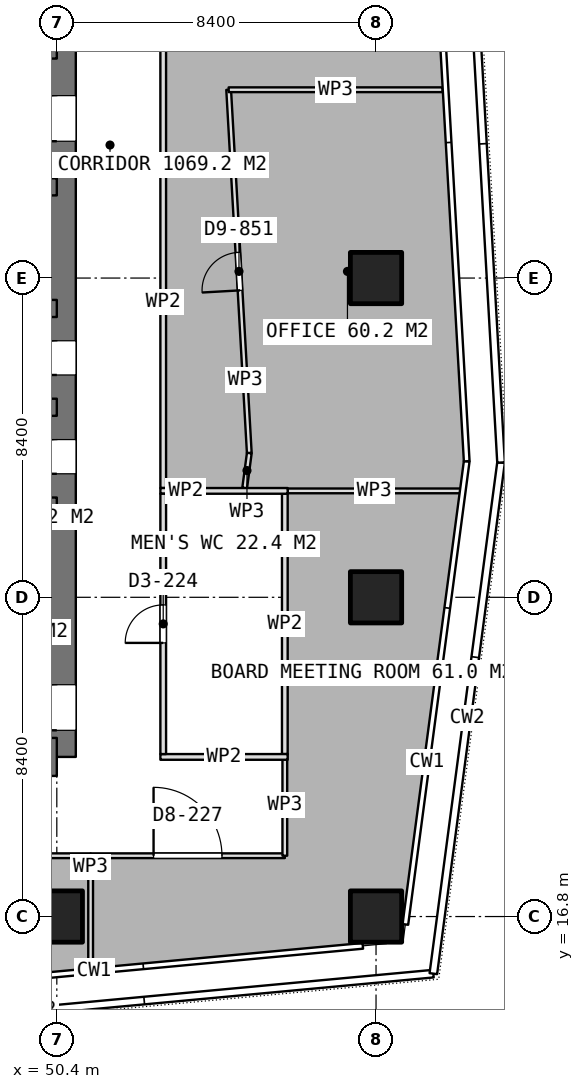
"""IFC4 building model, lengths in metres.
Left out: names, types, materials, properties, quantities, classifications, styles, units other than length and angle.
Written with IfcOpenShell. Run it as: python <this file> out.ifc"""

import sys

from ifc_helpers import new_model, si_unit, direction, frame, frame_2d, origin, origin_2d, place, context, subcontext, project, spatial, rectangle, extrude, element, fill, save


model = new_model("IFC4")
c1 = context("Model", 3, precision=1e-05, world=origin(), true_north=direction((0.0, 1.0)))
c2 = subcontext(c1, "Body", "Model", "MODEL_VIEW")
j1 = project(units=[si_unit("LENGTHUNIT", "METRE"), si_unit("PLANEANGLEUNIT", "RADIAN")], contexts=[c1])
p1 = place(None, origin())
s1 = spatial("IfcSite", under=j1, at=p1, CompositionType="ELEMENT")
p2 = place(p1, origin())
s2 = spatial("IfcBuilding", under=s1, at=p2, CompositionType="ELEMENT")
p3 = place(p2, frame((0.0, 0.0, 210.2)))
s3 = spatial("IfcBuildingStorey", under=s2, at=p3, CompositionType="ELEMENT", Elevation=210.2)
p4 = place(p3, frame((40.0, 21.0, 0.0), z_axis=(0.0, 0.0, 1.0), x_axis=(1.0, 0.0, 0.0)))
e1 = element("IfcWall", 1, at=p4, inside=s3, PredefinedType="SHEAR", context=c2, shape_type="SweptSolid", body=[
    extrude(rectangle(XDim=10.4, YDim=1.0, at=frame_2d((5.2, 0.0))), origin(), (0.0, 0.0, 1.0), 3.75),
])
p5 = place(p3, frame((50.4, 21.0, 0.0), z_axis=(0.0, 0.0, 1.0), x_axis=(0.0, 1.0, 0.0)))
e2 = element("IfcWall", 2, at=p5, inside=s3, PredefinedType="SHEAR", context=c2, shape_type="SweptSolid", body=[
    extrude(rectangle(XDim=25.2, YDim=1.0, at=frame_2d((12.6, 0.0))), origin(), (0.0, 0.0, 1.0), 3.75),
])
p6 = place(p5, frame((16.2, 0.0, 0.0)))
e3 = element("IfcOpeningElement", 3, at=p6, cuts=e2, PredefinedType="OPENING", context=c2, shape_type="SweptSolid", body=[
    extrude(rectangle(XDim=1.2, YDim=2.1, at=frame_2d((0.6, 1.05))), frame((0.0, 0.51, 0.0), z_axis=(0.0, -1.0, 0.0), x_axis=(1.0, 0.0, 0.0)), (0.0, 0.0, 1.0), 1.02),
])
p7 = place(p5, frame((10.05, 0.0, 0.0)))
e4 = element("IfcOpeningElement", 4, at=p7, cuts=e2, PredefinedType="OPENING", context=c2, shape_type="SweptSolid", body=[
    extrude(rectangle(XDim=0.9, YDim=2.1, at=frame_2d((0.45, 1.05))), frame((0.0, 0.51, 0.0), z_axis=(0.0, -1.0, 0.0), x_axis=(1.0, 0.0, 0.0)), (0.0, 0.0, 1.0), 1.02),
])
p8 = place(p5, frame((7.45, 0.0, 0.0)))
e5 = element("IfcOpeningElement", 5, at=p8, cuts=e2, PredefinedType="OPENING", context=c2, shape_type="SweptSolid", body=[
    extrude(rectangle(XDim=0.9, YDim=2.1, at=frame_2d((0.45, 1.05))), frame((0.0, 0.51, 0.0), z_axis=(0.0, -1.0, 0.0), x_axis=(1.0, 0.0, 0.0)), (0.0, 0.0, 1.0), 1.02),
])
p9 = place(p5, frame((0.7, 0.0, 0.0)))
e6 = element("IfcOpeningElement", 6, at=p9, cuts=e2, PredefinedType="OPENING", context=c2, shape_type="SweptSolid", body=[
    extrude(rectangle(XDim=1.2, YDim=2.1, at=frame_2d((0.6, 1.05))), frame((0.0, 0.51, 0.0), z_axis=(0.0, -1.0, 0.0), x_axis=(1.0, 0.0, 0.0)), (0.0, 0.0, 1.0), 1.02),
])
for number, where, z_axis, x_axis in (
    (7, (43.8, 27.6, 0.0), (0.0, 0.0, 1.0), (1.0, 0.0, 0.0)),
    (8, (43.8, 30.2, 0.0), (0.0, 0.0, 1.0), (1.0, 0.0, 0.0)),
    (9, (43.8, 32.8, 0.0), (0.0, 0.0, 1.0), (1.0, 0.0, 0.0)),
):
    element("IfcWall", number, at=place(p3, frame(where, z_axis=z_axis, x_axis=x_axis)), inside=s3, PredefinedType="SHEAR", context=c2, shape_type="SweptSolid", body=[
        extrude(rectangle(XDim=6.6, YDim=0.45, at=frame_2d((3.3, 0.0))), origin(), (0.0, 0.0, 1.0), 3.75),
    ])
p10 = place(p3, frame((43.8, 36.0, 0.0), z_axis=(0.0, 0.0, 1.0), x_axis=(1.0, 0.0, 0.0)))
e10 = element("IfcWall", 10, at=p10, inside=s3, PredefinedType="SHEAR", context=c2, shape_type="SweptSolid", body=[
    extrude(rectangle(XDim=6.6, YDim=0.45, at=frame_2d((3.3, 0.0))), origin(), (0.0, 0.0, 1.0), 3.75),
])
p11 = place(p10, frame((2.65, 0.0, 0.0)))
e11 = element("IfcOpeningElement", 11, at=p11, cuts=e10, PredefinedType="OPENING", context=c2, shape_type="SweptSolid", body=[
    extrude(rectangle(XDim=1.3, YDim=2.1, at=frame_2d((0.65, 1.05))), frame((0.0, 0.235, 0.0), z_axis=(0.0, -1.0, 0.0), x_axis=(1.0, 0.0, 0.0)), (0.0, 0.0, 1.0), 0.47),
])
p12 = place(p3, frame((43.8, 39.6, 0.0), z_axis=(0.0, 0.0, 1.0), x_axis=(1.0, 0.0, 0.0)))
e12 = element("IfcWall", 12, at=p12, inside=s3, PredefinedType="SHEAR", context=c2, shape_type="SweptSolid", body=[
    extrude(rectangle(XDim=6.6, YDim=0.45, at=frame_2d((3.3, 0.0))), origin(), (0.0, 0.0, 1.0), 3.75),
])
p13 = place(p12, frame((0.425, 0.0, 0.0)))
e13 = element("IfcOpeningElement", 13, at=p13, cuts=e12, PredefinedType="OPENING", context=c2, shape_type="SweptSolid", body=[
    extrude(rectangle(XDim=1.2, YDim=2.1, at=frame_2d((0.6, 1.05))), frame((0.0, 0.235, 0.0), z_axis=(0.0, -1.0, 0.0), x_axis=(1.0, 0.0, 0.0)), (0.0, 0.0, 1.0), 0.47),
])
for number, where, z_axis, x_axis in (
    (14, (50.4, 16.8, 0.0), (0.0, 0.0, 1.0), (1.0, 0.0, 0.0)),
    (15, (58.8, 16.8, 0.0), (0.0, 0.0, 1.0), (1.0, 0.0, 0.0)),
    (16, (58.8, 25.2, 0.0), (0.0, 0.0, 1.0), (1.0, 0.0, 0.0)),
    (17, (58.8, 33.6, 0.0), (0.0, 0.0, 1.0), (1.0, 0.0, 0.0)),
):
    element("IfcColumn", number, at=place(p3, frame(where, z_axis=z_axis, x_axis=x_axis)), inside=s3, PredefinedType="COLUMN", context=c2, shape_type="SweptSolid", body=[
        extrude(rectangle(XDim=1.35, YDim=1.35, at=origin_2d()), origin(), (0.0, 0.0, 1.0), 3.75),
    ])
for number, where, z_axis, x_axis in (
    (18, (53.125, 21.0, 0.0), (0.0, 0.0, 1.0), (1.0, 0.0, 0.0)),
    (19, (53.125, 28.0, 0.0), (0.0, 0.0, 1.0), (1.0, 0.0, 0.0)),
):
    element("IfcWall", number, at=place(p3, frame(where, z_axis=z_axis, x_axis=x_axis)), inside=s3, PredefinedType="PARTITIONING", context=c2, shape_type="SweptSolid", body=[
        extrude(rectangle(XDim=3.35, YDim=0.15, at=frame_2d((1.675, 0.0))), origin(), (0.0, 0.0, 1.0), 3.5),
    ])
p14 = place(p3, frame((53.2, 21.075, 0.0), z_axis=(0.0, 0.0, 1.0), x_axis=(0.0, 1.0, 0.0)))
e20 = element("IfcWall", 20, at=p14, inside=s3, PredefinedType="PARTITIONING", context=c2, shape_type="SweptSolid", body=[
    extrude(rectangle(XDim=6.85, YDim=0.15, at=frame_2d((3.425, 0.0))), origin(), (0.0, 0.0, 1.0), 3.5),
])
p15 = place(p14, frame((2.925, 0.0, 0.0)))
e21 = element("IfcOpeningElement", 21, at=p15, cuts=e20, PredefinedType="OPENING", context=c2, shape_type="SweptSolid", body=[
    extrude(rectangle(XDim=1.0, YDim=2.1, at=frame_2d((0.5, 1.05))), frame((0.0, 0.085, 0.0), z_axis=(0.0, -1.0, 0.0), x_axis=(1.0, 0.0, 0.0)), (0.0, 0.0, 1.0), 0.17),
])
p16 = place(p3, frame((56.4, 21.075, 0.0), z_axis=(0.0, 0.0, 1.0), x_axis=(0.0, 1.0, 0.0)))
e22 = element("IfcWall", 22, at=p16, inside=s3, PredefinedType="PARTITIONING", context=c2, shape_type="SweptSolid", body=[
    extrude(rectangle(XDim=6.85, YDim=0.15, at=frame_2d((3.425, 0.0))), origin(), (0.0, 0.0, 1.0), 3.5),
])
p17 = place(p3, frame((42.824, 18.4, 0.0), z_axis=(0.0, 0.0, 1.0), x_axis=(1.0, 0.0, 0.0)))
e23 = element("IfcWall", 23, at=p17, inside=s3, PredefinedType="PARTITIONING", context=c2, shape_type="SweptSolid", body=[
    extrude(rectangle(XDim=8.466, YDim=0.125, at=frame_2d((4.233, 0.0))), origin(), (0.0, 0.0, 1.0), 3.5),
])
p18 = place(p17, frame((3.733, 0.0, 0.0)))
e24 = element("IfcOpeningElement", 24, at=p18, cuts=e23, PredefinedType="OPENING", context=c2, shape_type="SweptSolid", body=[
    extrude(rectangle(XDim=1.0, YDim=2.1, at=frame_2d((0.5, 1.05))), frame((0.0, 0.073, 0.0), z_axis=(0.0, -1.0, 0.0), x_axis=(1.0, 0.0, 0.0)), (0.0, 0.0, 1.0), 0.145),
])
p19 = place(p3, frame((51.29, 18.4, 0.0), z_axis=(0.0, 0.0, 1.0), x_axis=(0.0, -1.0, 0.0)))
e25 = element("IfcWall", 25, at=p19, inside=s3, PredefinedType="PARTITIONING", context=c2, shape_type="SweptSolid", body=[
    extrude(rectangle(XDim=2.958, YDim=0.125, at=frame_2d((1.479, 0.0))), origin(), (0.0, 0.0, 1.0), 3.5),
])
p20 = place(p3, frame((56.476, 28.0, 0.0), z_axis=(0.0, 0.0, 1.0), x_axis=(1.0, 0.0, 0.0)))
e26 = element("IfcWall", 26, at=p20, inside=s3, PredefinedType="PARTITIONING", context=c2, shape_type="SweptSolid", body=[
    extrude(rectangle(XDim=4.556, YDim=0.125, at=frame_2d((2.278, 0.0))), origin(), (0.0, 0.0, 1.0), 3.5),
])
p21 = place(p3, frame((51.291, 18.4, 0.0), z_axis=(0.0, 0.0, 1.0), x_axis=(1.0, 0.0, 0.0)))
e27 = element("IfcWall", 27, at=p21, inside=s3, PredefinedType="PARTITIONING", context=c2, shape_type="SweptSolid", body=[
    extrude(rectangle(XDim=5.109, YDim=0.125, at=frame_2d((2.554, 0.0))), origin(), (0.0, 0.0, 1.0), 3.5),
])
p22 = place(p21, frame((1.655, 0.0, 0.0)))
e28 = element("IfcOpeningElement", 28, at=p22, cuts=e27, PredefinedType="OPENING", context=c2, shape_type="SweptSolid", body=[
    extrude(rectangle(XDim=1.8, YDim=2.1, at=frame_2d((0.9, 1.05))), frame((0.0, 0.073, 0.0), z_axis=(0.0, -1.0, 0.0), x_axis=(1.0, 0.0, 0.0)), (0.0, 0.0, 1.0), 0.145),
])
p23 = place(p3, frame((56.4, 18.4, 0.0), z_axis=(0.0, 0.0, 1.0), x_axis=(0.0, 1.0, 0.0)))
e29 = element("IfcWall", 29, at=p23, inside=s3, PredefinedType="PARTITIONING", context=c2, shape_type="SweptSolid", body=[
    extrude(rectangle(XDim=2.675, YDim=0.125, at=frame_2d((1.337, 0.0))), origin(), (0.0, 0.0, 1.0), 3.5),
])
p24 = place(p3, frame((55.343, 28.075, 0.0), z_axis=(0.0, 0.0, 1.0), x_axis=(0.131509017553, 0.991314974316, 0.0)))
e30 = element("IfcWall", 30, at=p24, inside=s3, PredefinedType="PARTITIONING", context=c2, shape_type="SweptSolid", body=[
    extrude(rectangle(XDim=0.928, YDim=0.125, at=frame_2d((0.464, 0.0))), origin(), (0.0, 0.0, 1.0), 3.5),
])
p25 = place(p3, frame((55.465, 28.995, 0.0), z_axis=(0.0, 0.0, 1.0), x_axis=(-0.056705607074, 0.99839094253, 0.0)))
e31 = element("IfcWall", 31, at=p25, inside=s3, PredefinedType="PARTITIONING", context=c2, shape_type="SweptSolid", body=[
    extrude(rectangle(XDim=9.575, YDim=0.125, at=frame_2d((4.788, 0.0))), origin(), (0.0, 0.0, 1.0), 3.5),
])
p26 = place(p25, frame((4.288, 0.0, 0.0)))
e32 = element("IfcOpeningElement", 32, at=p26, cuts=e31, PredefinedType="OPENING", context=c2, shape_type="SweptSolid", body=[
    extrude(rectangle(XDim=1.0, YDim=2.1, at=frame_2d((0.5, 1.05))), frame((0.0, 0.073, 0.0), z_axis=(0.0, -1.0, 0.0), x_axis=(1.0, 0.0, 0.0)), (0.0, 0.0, 1.0), 0.145),
])
p27 = place(p3, frame((54.922, 38.555, 0.0), z_axis=(0.0, 0.0, 1.0), x_axis=(1.0, 0.0, 0.0)))
e33 = element("IfcWall", 33, at=p27, inside=s3, PredefinedType="PARTITIONING", context=c2, shape_type="SweptSolid", body=[
    extrude(rectangle(XDim=5.629, YDim=0.125, at=frame_2d((2.814, 0.0))), origin(), (0.0, 0.0, 1.0), 3.5),
])
p28 = place(p3, frame((53.2, 28.075, 0.0), z_axis=(0.0, 0.0, 1.0), x_axis=(0.0, 1.0, 0.0)))
e34 = element("IfcWall", 34, at=p28, inside=s3, PredefinedType="PARTITIONING", context=c2, shape_type="SweptSolid", body=[
    extrude(rectangle(XDim=24.5, YDim=0.15, at=frame_2d((12.25, 0.0))), origin(), (0.0, 0.0, 1.0), 3.5),
])
p29 = place(p28, frame((11.713, 0.0, 0.0)))
e35 = element("IfcOpeningElement", 35, at=p29, cuts=e34, PredefinedType="OPENING", context=c2, shape_type="SweptSolid", body=[
    extrude(rectangle(XDim=1.0, YDim=2.1, at=frame_2d((0.5, 1.05))), frame((0.0, 0.085, 0.0), z_axis=(0.0, -1.0, 0.0), x_axis=(1.0, 0.0, 0.0)), (0.0, 0.0, 1.0), 0.17),
])
p30 = place(p6, origin())
e36 = element("IfcDoor", 36, at=p30, inside=s3, OperationType="SINGLE_SWING_LEFT", PredefinedType="DOOR", context=c2, shape_type="SweptSolid", body=[
    extrude(rectangle(XDim=1.2, YDim=2.1, at=frame_2d((0.6, 1.05))), frame((0.0, 0.025, 0.0), z_axis=(0.0, -1.0, 0.0), x_axis=(1.0, 0.0, 0.0)), (0.0, 0.0, 1.0), 0.05),
])
fill(e3, e36)
p31 = place(p7, origin())
e37 = element("IfcDoor", 37, at=p31, inside=s3, OperationType="SINGLE_SWING_LEFT", PredefinedType="DOOR", context=c2, shape_type="SweptSolid", body=[
    extrude(rectangle(XDim=0.9, YDim=2.1, at=frame_2d((0.45, 1.05))), frame((0.0, 0.025, 0.0), z_axis=(0.0, -1.0, 0.0), x_axis=(1.0, 0.0, 0.0)), (0.0, 0.0, 1.0), 0.05),
])
fill(e4, e37)
p32 = place(p8, origin())
e38 = element("IfcDoor", 38, at=p32, inside=s3, OperationType="SINGLE_SWING_LEFT", PredefinedType="DOOR", context=c2, shape_type="SweptSolid", body=[
    extrude(rectangle(XDim=0.9, YDim=2.1, at=frame_2d((0.45, 1.05))), frame((0.0, 0.025, 0.0), z_axis=(0.0, -1.0, 0.0), x_axis=(1.0, 0.0, 0.0)), (0.0, 0.0, 1.0), 0.05),
])
fill(e5, e38)
p33 = place(p15, origin())
e39 = element("IfcDoor", 39, at=p33, inside=s3, OperationType="SINGLE_SWING_LEFT", PredefinedType="DOOR", context=c2, shape_type="SweptSolid", body=[
    extrude(rectangle(XDim=1.0, YDim=2.1, at=frame_2d((0.5, 1.05))), frame((0.0, 0.025, 0.0), z_axis=(0.0, -1.0, 0.0), x_axis=(1.0, 0.0, 0.0)), (0.0, 0.0, 1.0), 0.05),
])
fill(e21, e39)
p34 = place(p22, origin())
e40 = element("IfcDoor", 40, at=p34, inside=s3, OperationType="DOUBLE_DOOR_SINGLE_SWING", PredefinedType="DOOR", context=c2, shape_type="SweptSolid", body=[
    extrude(rectangle(XDim=1.8, YDim=2.1, at=frame_2d((0.9, 1.05))), frame((0.0, 0.025, 0.0), z_axis=(0.0, -1.0, 0.0), x_axis=(1.0, 0.0, 0.0)), (0.0, 0.0, 1.0), 0.05),
])
fill(e28, e40)
p35 = place(p26, origin())
e41 = element("IfcDoor", 41, at=p35, inside=s3, OperationType="SINGLE_SWING_LEFT", PredefinedType="DOOR", context=c2, shape_type="SweptSolid", body=[
    extrude(rectangle(XDim=1.0, YDim=2.1, at=frame_2d((0.5, 1.05))), frame((0.0, 0.025, 0.0), z_axis=(0.0, -1.0, 0.0), x_axis=(1.0, 0.0, 0.0)), (0.0, 0.0, 1.0), 0.05),
])
fill(e32, e41)
p36 = place(p9, origin())
e42 = element("IfcDoor", 42, at=p36, inside=s3, OperationType="SINGLE_SWING_RIGHT", PredefinedType="DOOR", context=c2, shape_type="SweptSolid", body=[
    extrude(rectangle(XDim=1.2, YDim=2.1, at=frame_2d((0.6, 1.05))), frame((0.0, 0.025, 0.0), z_axis=(0.0, -1.0, 0.0), x_axis=(1.0, 0.0, 0.0)), (0.0, 0.0, 1.0), 0.05),
])
fill(e6, e42)
save(model, sys.argv[1])
